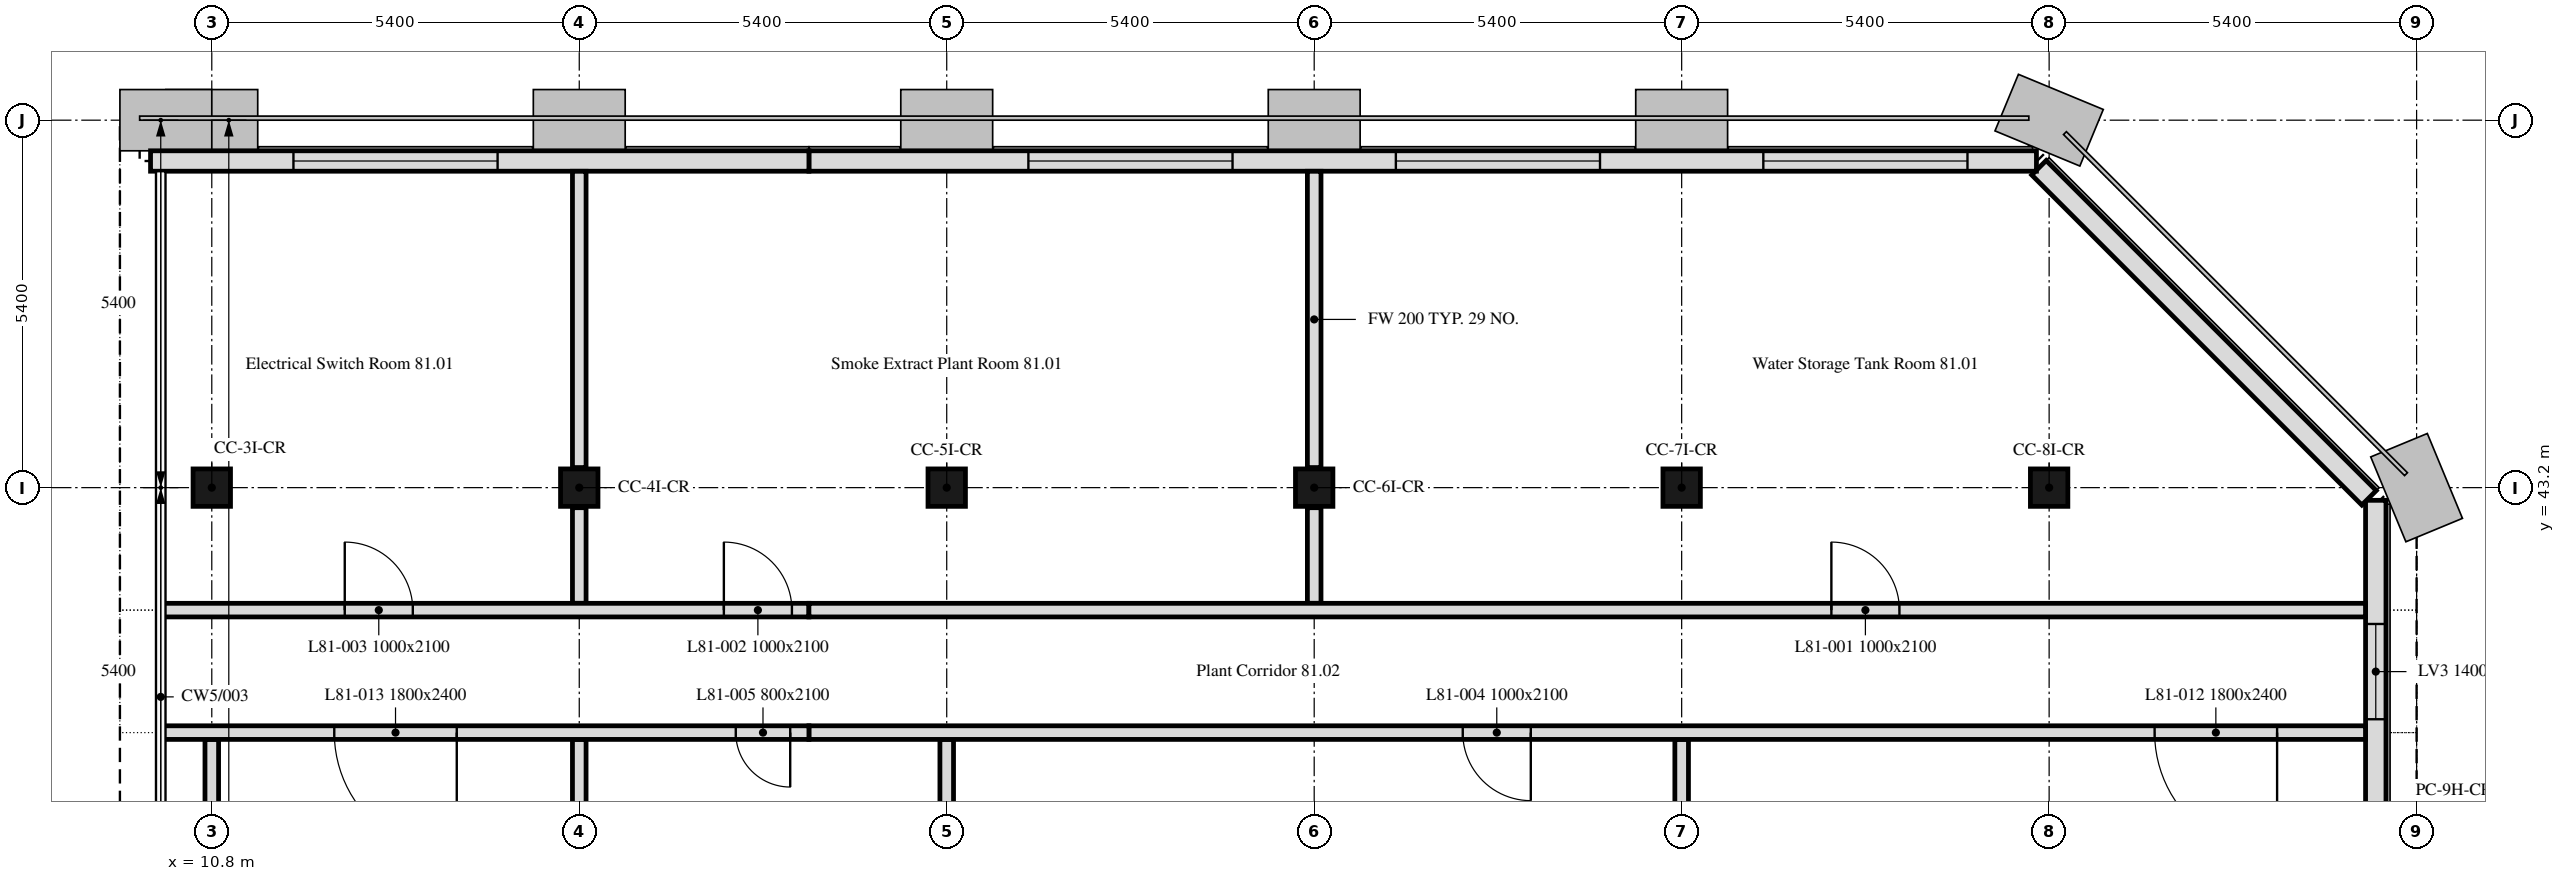
"""IFC4 building model, lengths in metres.
Left out: names, types, materials, properties, quantities, classifications, styles, units other than length and angle.
Written with IfcOpenShell. Run it as: python <this file> out.ifc"""

import sys

from ifc_helpers import new_model, si_unit, direction, frame, frame_2d, origin, origin_2d, place, context, subcontext, project, spatial, polyline, rectangle, outline, extrude, element, fill, save


model = new_model("IFC4")
c1 = context("Model", 3, precision=1e-05, world=origin(), true_north=direction((0.0, 1.0)))
c2 = subcontext(c1, "Body", "Model", "MODEL_VIEW")
j1 = project(units=[si_unit("LENGTHUNIT", "METRE"), si_unit("PLANEANGLEUNIT", "RADIAN")], contexts=[c1])
p1 = place(None, origin())
s1 = spatial("IfcSite", under=j1, at=p1, CompositionType="ELEMENT")
p2 = place(p1, origin())
s2 = spatial("IfcBuilding", under=s1, at=p2, CompositionType="ELEMENT")
p3 = place(p2, frame((0.0, 0.0, 326.2)))
s3 = spatial("IfcBuildingStorey", under=s2, at=p3, CompositionType="ELEMENT", Elevation=326.2)
p4 = place(p3, frame((10.8, 43.2, 0.0), z_axis=(0.0, 0.0, 1.0), x_axis=(1.0, 0.0, 0.0)))
e1 = element("IfcColumn", 1, at=p4, inside=s3, PredefinedType="COLUMN", context=c2, shape_type="SweptSolid", body=[
    extrude(rectangle(XDim=0.55, YDim=0.55, at=origin_2d()), origin(), (0.0, 0.0, 1.0), 3.3),
])
for number, where, z_axis, x_axis in (
    (2, (16.2, 43.2, 0.0), (0.0, 0.0, 1.0), (1.0, 0.0, 0.0)),
    (3, (21.6, 43.2, 0.0), (0.0, 0.0, 1.0), (1.0, 0.0, 0.0)),
    (4, (27.0, 43.2, 0.0), (0.0, 0.0, 1.0), (1.0, 0.0, 0.0)),
    (5, (32.4, 43.2, 0.0), (0.0, 0.0, 1.0), (1.0, 0.0, 0.0)),
    (6, (37.8, 43.2, 0.0), (0.0, 0.0, 1.0), (1.0, 0.0, 0.0)),
):
    element("IfcColumn", number, at=place(p3, frame(where, z_axis=z_axis, x_axis=x_axis)), inside=s3, PredefinedType="COLUMN", context=c2, shape_type="SweptSolid", body=[
        extrude(rectangle(XDim=0.55, YDim=0.55, at=origin_2d()), origin(), (0.0, 0.0, 1.0), 4.2),
    ])
p5 = place(p3, frame((42.6, 32.4, 0.0), z_axis=(0.0, 0.0, 1.0), x_axis=(0.0, 1.0, 0.0)))
e7 = element("IfcWall", 7, at=p5, inside=s3, PredefinedType="SOLIDWALL", context=c2, shape_type="SweptSolid", body=[
    extrude(outline(polyline([(0.0, 0.0), (10.614, 0.0), (10.614, 4.2), (10.024, 4.2), (9.434, 4.2), (8.845, 4.2), (8.255, 4.2), (7.665, 4.2), (7.076, 4.2), (6.486, 4.2), (5.896, 4.2), (5.307, 4.2), (4.717, 4.2), (4.127, 4.2), (3.538, 4.2), (2.948, 4.2), (2.359, 4.2), (1.769, 4.2), (1.179, 4.2), (0.59, 4.2), (0.0, 4.2), (0.0, 0.0)])), frame((0.0, 0.15, 0.0), z_axis=(0.0, -1.0, 0.0), x_axis=(1.0, 0.0, 0.0)), (0.0, 0.0, 1.0), 0.3),
])
p6 = place(p5, frame((1.2, 0.0, 0.6)))
e8 = element("IfcOpeningElement", 8, at=p6, cuts=e7, PredefinedType="OPENING", context=c2, shape_type="SweptSolid", body=[
    extrude(rectangle(XDim=3.0, YDim=1.8, at=frame_2d((1.5, 0.9))), frame((0.0, 0.16, 0.0), z_axis=(0.0, -1.0, 0.0), x_axis=(1.0, 0.0, 0.0)), (0.0, 0.0, 1.0), 0.32),
])
p7 = place(p5, frame((7.396, 0.0, 0.6)))
e9 = element("IfcOpeningElement", 9, at=p7, cuts=e7, PredefinedType="OPENING", context=c2, shape_type="SweptSolid", body=[
    extrude(rectangle(XDim=1.4, YDim=1.8, at=frame_2d((0.7, 0.9))), frame((0.0, 0.16, 0.0), z_axis=(0.0, -1.0, 0.0), x_axis=(1.0, 0.0, 0.0)), (0.0, 0.0, 1.0), 0.32),
])
p8 = place(p3, frame((42.501, 43.051, 0.0), z_axis=(0.0, 0.0, 1.0), x_axis=(-0.707106781187, 0.707106781187, 0.0)))
e10 = element("IfcWall", 10, at=p8, inside=s3, PredefinedType="SOLIDWALL", context=c2, shape_type="SweptSolid", body=[
    extrude(outline(polyline([(0.0, 0.0), (6.86, 0.0), (6.86, 4.2), (6.288, 4.2), (5.716, 4.2), (5.145, 4.2), (4.573, 4.2), (4.001, 4.2), (3.43, 4.2), (2.858, 4.2), (2.287, 4.2), (1.715, 4.2), (1.143, 4.2), (0.572, 4.2), (0.0, 4.2), (0.0, 0.0)])), frame((0.0, 0.15, 0.0), z_axis=(0.0, -1.0, 0.0), x_axis=(1.0, 0.0, 0.0)), (0.0, 0.0, 1.0), 0.3),
])
p9 = place(p3, frame((37.614, 48.0, 0.0), z_axis=(0.0, 0.0, 1.0), x_axis=(-1.0, 0.0, 0.0)))
e11 = element("IfcWall", 11, at=p9, inside=s3, PredefinedType="SOLIDWALL", context=c2, shape_type="SweptSolid", body=[
    extrude(outline(polyline([(0.0, 0.0), (18.039, 0.0), (18.039, 4.2), (17.457, 4.2), (16.875, 4.2), (16.293, 4.2), (15.711, 4.2), (15.129, 4.2), (14.547, 4.2), (13.965, 4.2), (13.384, 4.2), (12.802, 4.2), (12.22, 4.2), (11.638, 4.2), (11.056, 4.2), (10.474, 4.2), (9.892, 4.2), (9.31, 4.2), (8.728, 4.2), (8.146, 4.2), (7.565, 4.2), (6.983, 4.2), (6.401, 4.2), (5.819, 4.2), (5.237, 4.2), (4.655, 4.2), (4.073, 4.2), (3.491, 4.2), (2.909, 4.2), (2.328, 4.2), (1.746, 4.2), (1.164, 4.2), (0.582, 4.2), (0.0, 4.2), (0.0, 0.0)])), frame((0.0, 0.15, 0.0), z_axis=(0.0, -1.0, 0.0), x_axis=(1.0, 0.0, 0.0)), (0.0, 0.0, 1.0), 0.3),
])
p10 = place(p9, frame((1.014, 0.0, 0.6)))
e12 = element("IfcOpeningElement", 12, at=p10, cuts=e11, PredefinedType="OPENING", context=c2, shape_type="SweptSolid", body=[
    extrude(rectangle(XDim=3.0, YDim=1.8, at=frame_2d((1.5, 0.9))), frame((0.0, 0.16, 0.0), z_axis=(0.0, -1.0, 0.0), x_axis=(1.0, 0.0, 0.0)), (0.0, 0.0, 1.0), 0.32),
])
p11 = place(p9, frame((6.414, 0.0, 0.6)))
e13 = element("IfcOpeningElement", 13, at=p11, cuts=e11, PredefinedType="OPENING", context=c2, shape_type="SweptSolid", body=[
    extrude(rectangle(XDim=3.0, YDim=1.8, at=frame_2d((1.5, 0.9))), frame((0.0, 0.16, 0.0), z_axis=(0.0, -1.0, 0.0), x_axis=(1.0, 0.0, 0.0)), (0.0, 0.0, 1.0), 0.32),
])
p12 = place(p9, frame((11.814, 0.0, 0.6)))
e14 = element("IfcOpeningElement", 14, at=p12, cuts=e11, PredefinedType="OPENING", context=c2, shape_type="SweptSolid", body=[
    extrude(rectangle(XDim=3.0, YDim=1.8, at=frame_2d((1.5, 0.9))), frame((0.0, 0.16, 0.0), z_axis=(0.0, -1.0, 0.0), x_axis=(1.0, 0.0, 0.0)), (0.0, 0.0, 1.0), 0.32),
])
p13 = place(p3, frame((19.575, 48.0, 0.0), z_axis=(0.0, 0.0, 1.0), x_axis=(-1.0, 0.0, 0.0)))
e15 = element("IfcWall", 15, at=p13, inside=s3, PredefinedType="SOLIDWALL", context=c2, shape_type="SweptSolid", body=[
    extrude(outline(polyline([(0.0, 0.0), (9.675, 0.0), (9.675, 2.9), (9.106, 3.153), (8.537, 3.406), (7.968, 3.659), (7.398, 3.912), (6.829, 4.165), (6.26, 4.418), (5.691, 4.671), (5.122, 4.924), (4.553, 5.177), (3.984, 5.429), (3.415, 5.682), (2.846, 5.935), (2.276, 6.188), (1.707, 6.441), (1.138, 6.694), (0.569, 6.947), (0.0, 4.2), (0.0, 0.0)])), frame((0.0, 0.15, 0.0), z_axis=(0.0, -1.0, 0.0), x_axis=(1.0, 0.0, 0.0)), (0.0, 0.0, 1.0), 0.3),
])
p14 = place(p13, frame((4.575, 0.0, 0.6)))
e16 = element("IfcOpeningElement", 16, at=p14, cuts=e15, PredefinedType="OPENING", context=c2, shape_type="SweptSolid", body=[
    extrude(rectangle(XDim=3.0, YDim=1.8, at=frame_2d((1.5, 0.9))), frame((0.0, 0.16, 0.0), z_axis=(0.0, -1.0, 0.0), x_axis=(1.0, 0.0, 0.0)), (0.0, 0.0, 1.0), 0.32),
])
p15 = place(p3, frame((27.0, 47.849, 0.0), z_axis=(0.0, 0.0, 1.0), x_axis=(0.0, -1.0, 0.0)))
e17 = element("IfcWall", 17, at=p15, inside=s3, PredefinedType="PARTITIONING", context=c2, shape_type="SweptSolid", body=[
    extrude(rectangle(XDim=4.354, YDim=0.2, at=frame_2d((2.177, 0.0))), origin(), (0.0, 0.0, 1.0), 3.45),
])
p16 = place(p3, frame((27.0, 42.905, 0.0), z_axis=(0.0, 0.0, 1.0), x_axis=(0.0, -1.0, 0.0)))
e18 = element("IfcWall", 18, at=p16, inside=s3, PredefinedType="PARTITIONING", context=c2, shape_type="SweptSolid", body=[
    extrude(rectangle(XDim=1.405, YDim=0.2, at=frame_2d((0.703, 0.0))), origin(), (0.0, 0.0, 1.0), 3.45),
])
p17 = place(p3, frame((16.2, 47.849, 0.0), z_axis=(0.0, 0.0, 1.0), x_axis=(0.0, -1.0, 0.0)))
e19 = element("IfcWall", 19, at=p17, inside=s3, PredefinedType="PARTITIONING", context=c2, shape_type="SweptSolid", body=[
    extrude(rectangle(XDim=4.354, YDim=0.2, at=frame_2d((2.177, 0.0))), origin(), (0.0, 0.0, 1.0), 5.7),
])
p18 = place(p3, frame((16.2, 42.905, 0.0), z_axis=(0.0, 0.0, 1.0), x_axis=(0.0, -1.0, 0.0)))
e20 = element("IfcWall", 20, at=p18, inside=s3, PredefinedType="PARTITIONING", context=c2, shape_type="SweptSolid", body=[
    extrude(rectangle(XDim=1.405, YDim=0.2, at=frame_2d((0.703, 0.0))), origin(), (0.0, 0.0, 1.0), 5.7),
])
p19 = place(p3, frame((10.05, 41.4, 0.0), z_axis=(0.0, 0.0, 1.0), x_axis=(1.0, 0.0, 0.0)))
e21 = element("IfcWall", 21, at=p19, inside=s3, PredefinedType="PARTITIONING", context=c2, shape_type="SweptSolid", body=[
    extrude(outline(polyline([(0.0, 0.0), (9.525, 0.0), (9.525, 4.2), (0.0, 2.967), (0.0, 0.0)])), frame((0.0, 0.1, 0.0), z_axis=(0.0, -1.0, 0.0), x_axis=(1.0, 0.0, 0.0)), (0.0, 0.0, 1.0), 0.2),
])
p20 = place(p19, frame((8.275, 0.0, 0.0)))
e22 = element("IfcOpeningElement", 22, at=p20, cuts=e21, PredefinedType="OPENING", context=c2, shape_type="SweptSolid", body=[
    extrude(rectangle(XDim=1.0, YDim=2.1, at=frame_2d((0.5, 1.05))), frame((0.0, 0.1, 0.0), z_axis=(0.0, -1.0, 0.0), x_axis=(1.0, 0.0, 0.0)), (0.0, 0.0, 1.0), 0.2),
])
p21 = place(p19, frame((2.704, 0.0, 0.0)))
e23 = element("IfcOpeningElement", 23, at=p21, cuts=e21, PredefinedType="OPENING", context=c2, shape_type="SweptSolid", body=[
    extrude(rectangle(XDim=1.0, YDim=2.1, at=frame_2d((0.5, 1.05))), frame((0.0, 0.1, 0.0), z_axis=(0.0, -1.0, 0.0), x_axis=(1.0, 0.0, 0.0)), (0.0, 0.0, 1.0), 0.2),
])
p22 = place(p3, frame((19.575, 41.4, 0.0), z_axis=(0.0, 0.0, 1.0), x_axis=(1.0, 0.0, 0.0)))
e24 = element("IfcWall", 24, at=p22, inside=s3, PredefinedType="PARTITIONING", context=c2, shape_type="SweptSolid", body=[
    extrude(rectangle(XDim=22.874, YDim=0.2, at=frame_2d((11.437, 0.0))), origin(), (0.0, 0.0, 1.0), 3.45),
])
p23 = place(p22, frame((15.025, 0.0, 0.0)))
e25 = element("IfcOpeningElement", 25, at=p23, cuts=e24, PredefinedType="OPENING", context=c2, shape_type="SweptSolid", body=[
    extrude(rectangle(XDim=1.0, YDim=2.1, at=frame_2d((0.5, 1.05))), frame((0.0, 0.1, 0.0), z_axis=(0.0, -1.0, 0.0), x_axis=(1.0, 0.0, 0.0)), (0.0, 0.0, 1.0), 0.2),
])
for number, where, z_axis, x_axis in (
    (26, (32.4, 38.095, 0.0), (0.0, 0.0, 1.0), (0.0, 1.0, 0.0)),
    (27, (21.6, 39.5, 0.0), (0.0, 0.0, 1.0), (0.0, -1.0, 0.0)),
):
    element("IfcWall", number, at=place(p3, frame(where, z_axis=z_axis, x_axis=x_axis)), inside=s3, PredefinedType="PARTITIONING", context=c2, shape_type="SweptSolid", body=[
        extrude(rectangle(XDim=1.405, YDim=0.2, at=frame_2d((0.703, 0.0))), origin(), (0.0, 0.0, 1.0), 3.45),
    ])
p24 = place(p3, frame((16.2, 39.5, 0.0), z_axis=(0.0, 0.0, 1.0), x_axis=(0.0, -1.0, 0.0)))
e28 = element("IfcWall", 28, at=p24, inside=s3, PredefinedType="PARTITIONING", context=c2, shape_type="SweptSolid", body=[
    extrude(rectangle(XDim=1.405, YDim=0.2, at=frame_2d((0.703, 0.0))), origin(), (0.0, 0.0, 1.0), 5.7),
])
p25 = place(p3, frame((10.8, 39.5, 0.0), z_axis=(0.0, 0.0, 1.0), x_axis=(0.0, -1.0, 0.0)))
e29 = element("IfcWall", 29, at=p25, inside=s3, PredefinedType="PARTITIONING", context=c2, shape_type="SweptSolid", body=[
    extrude(rectangle(XDim=1.405, YDim=0.2, at=frame_2d((0.703, 0.0))), origin(), (0.0, 0.0, 1.0), 3.3),
])
p26 = place(p3, frame((42.449, 39.6, 0.0), z_axis=(0.0, 0.0, 1.0), x_axis=(-1.0, 0.0, 0.0)))
e30 = element("IfcWall", 30, at=p26, inside=s3, PredefinedType="PARTITIONING", context=c2, shape_type="SweptSolid", body=[
    extrude(rectangle(XDim=22.874, YDim=0.2, at=frame_2d((11.437, 0.0))), origin(), (0.0, 0.0, 1.0), 3.45),
])
p27 = place(p26, frame((12.266, 0.0, 0.0)))
e31 = element("IfcOpeningElement", 31, at=p27, cuts=e30, PredefinedType="OPENING", context=c2, shape_type="SweptSolid", body=[
    extrude(rectangle(XDim=1.0, YDim=2.1, at=frame_2d((0.5, 1.05))), frame((0.0, 0.1, 0.0), z_axis=(0.0, -1.0, 0.0), x_axis=(1.0, 0.0, 0.0)), (0.0, 0.0, 1.0), 0.2),
])
p28 = place(p26, frame((1.299, 0.0, 0.0)))
e32 = element("IfcOpeningElement", 32, at=p28, cuts=e30, PredefinedType="OPENING", context=c2, shape_type="SweptSolid", body=[
    extrude(rectangle(XDim=1.8, YDim=2.4, at=frame_2d((0.9, 1.2))), frame((0.0, 0.1, 0.0), z_axis=(0.0, -1.0, 0.0), x_axis=(1.0, 0.0, 0.0)), (0.0, 0.0, 1.0), 0.2),
])
p29 = place(p3, frame((19.575, 39.6, 0.0), z_axis=(0.0, 0.0, 1.0), x_axis=(-1.0, 0.0, 0.0)))
e33 = element("IfcWall", 33, at=p29, inside=s3, PredefinedType="PARTITIONING", context=c2, shape_type="SweptSolid", body=[
    extrude(outline(polyline([(0.0, 0.0), (9.525, 0.0), (9.525, 2.967), (0.0, 4.2), (0.0, 0.0)])), frame((0.0, 0.1, 0.0), z_axis=(0.0, -1.0, 0.0), x_axis=(1.0, 0.0, 0.0)), (0.0, 0.0, 1.0), 0.2),
])
p30 = place(p29, frame((0.275, 0.0, 0.0)))
e34 = element("IfcOpeningElement", 34, at=p30, cuts=e33, PredefinedType="OPENING", context=c2, shape_type="SweptSolid", body=[
    extrude(rectangle(XDim=0.8, YDim=2.1, at=frame_2d((0.4, 1.05))), frame((0.0, 0.1, 0.0), z_axis=(0.0, -1.0, 0.0), x_axis=(1.0, 0.0, 0.0)), (0.0, 0.0, 1.0), 0.2),
])
p31 = place(p29, frame((5.175, 0.0, 0.0)))
e35 = element("IfcOpeningElement", 35, at=p31, cuts=e33, PredefinedType="OPENING", context=c2, shape_type="SweptSolid", body=[
    extrude(rectangle(XDim=1.8, YDim=2.4, at=frame_2d((0.9, 1.2))), frame((0.0, 0.1, 0.0), z_axis=(0.0, -1.0, 0.0), x_axis=(1.0, 0.0, 0.0)), (0.0, 0.0, 1.0), 0.2),
])
p32 = place(p7, origin())
e36 = element("IfcWindow", 36, at=p32, inside=s3, PartitioningType="SINGLE_PANEL", PredefinedType="WINDOW", context=c2, shape_type="SweptSolid", body=[
    extrude(rectangle(XDim=1.4, YDim=1.8, at=frame_2d((0.7, 0.9))), frame((0.0, 0.03, 0.0), z_axis=(0.0, -1.0, 0.0), x_axis=(1.0, 0.0, 0.0)), (0.0, 0.0, 1.0), 0.06),
])
fill(e9, e36)
p33 = place(p10, origin())
e37 = element("IfcWindow", 37, at=p33, inside=s3, PartitioningType="SINGLE_PANEL", PredefinedType="WINDOW", context=c2, shape_type="SweptSolid", body=[
    extrude(rectangle(XDim=3.0, YDim=1.8, at=frame_2d((1.5, 0.9))), frame((0.0, 0.03, 0.0), z_axis=(0.0, -1.0, 0.0), x_axis=(1.0, 0.0, 0.0)), (0.0, 0.0, 1.0), 0.06),
])
fill(e12, e37)
p34 = place(p11, origin())
e38 = element("IfcWindow", 38, at=p34, inside=s3, PartitioningType="SINGLE_PANEL", PredefinedType="WINDOW", context=c2, shape_type="SweptSolid", body=[
    extrude(rectangle(XDim=3.0, YDim=1.8, at=frame_2d((1.5, 0.9))), frame((0.0, 0.03, 0.0), z_axis=(0.0, -1.0, 0.0), x_axis=(1.0, 0.0, 0.0)), (0.0, 0.0, 1.0), 0.06),
])
fill(e13, e38)
p35 = place(p12, origin())
e39 = element("IfcWindow", 39, at=p35, inside=s3, PartitioningType="SINGLE_PANEL", PredefinedType="WINDOW", context=c2, shape_type="SweptSolid", body=[
    extrude(rectangle(XDim=3.0, YDim=1.8, at=frame_2d((1.5, 0.9))), frame((0.0, 0.03, 0.0), z_axis=(0.0, -1.0, 0.0), x_axis=(1.0, 0.0, 0.0)), (0.0, 0.0, 1.0), 0.06),
])
fill(e14, e39)
p36 = place(p14, origin())
e40 = element("IfcWindow", 40, at=p36, inside=s3, PartitioningType="SINGLE_PANEL", PredefinedType="WINDOW", context=c2, shape_type="SweptSolid", body=[
    extrude(rectangle(XDim=3.0, YDim=1.8, at=frame_2d((1.5, 0.9))), frame((0.0, 0.03, 0.0), z_axis=(0.0, -1.0, 0.0), x_axis=(1.0, 0.0, 0.0)), (0.0, 0.0, 1.0), 0.06),
])
fill(e16, e40)
p37 = place(p23, origin())
e41 = element("IfcDoor", 41, at=p37, inside=s3, OperationType="SINGLE_SWING_LEFT", PredefinedType="DOOR", context=c2, shape_type="SweptSolid", body=[
    extrude(rectangle(XDim=1.0, YDim=2.1, at=frame_2d((0.5, 1.05))), frame((0.0, 0.025, 0.0), z_axis=(0.0, -1.0, 0.0), x_axis=(1.0, 0.0, 0.0)), (0.0, 0.0, 1.0), 0.05),
])
fill(e25, e41)
p38 = place(p20, origin())
e42 = element("IfcDoor", 42, at=p38, inside=s3, OperationType="SINGLE_SWING_RIGHT", PredefinedType="DOOR", context=c2, shape_type="SweptSolid", body=[
    extrude(rectangle(XDim=1.0, YDim=2.1, at=frame_2d((0.5, 1.05))), frame((0.0, 0.025, 0.0), z_axis=(0.0, -1.0, 0.0), x_axis=(1.0, 0.0, 0.0)), (0.0, 0.0, 1.0), 0.05),
])
fill(e22, e42)
p39 = place(p21, origin())
e43 = element("IfcDoor", 43, at=p39, inside=s3, OperationType="SINGLE_SWING_RIGHT", PredefinedType="DOOR", context=c2, shape_type="SweptSolid", body=[
    extrude(rectangle(XDim=1.0, YDim=2.1, at=frame_2d((0.5, 1.05))), frame((0.0, 0.025, 0.0), z_axis=(0.0, -1.0, 0.0), x_axis=(1.0, 0.0, 0.0)), (0.0, 0.0, 1.0), 0.05),
])
fill(e23, e43)
p40 = place(p27, origin())
e44 = element("IfcDoor", 44, at=p40, inside=s3, OperationType="SINGLE_SWING_LEFT", PredefinedType="DOOR", context=c2, shape_type="SweptSolid", body=[
    extrude(rectangle(XDim=1.0, YDim=2.1, at=frame_2d((0.5, 1.05))), frame((0.0, 0.025, 0.0), z_axis=(0.0, -1.0, 0.0), x_axis=(1.0, 0.0, 0.0)), (0.0, 0.0, 1.0), 0.05),
])
fill(e31, e44)
p41 = place(p30, origin())
e45 = element("IfcDoor", 45, at=p41, inside=s3, OperationType="SINGLE_SWING_RIGHT", PredefinedType="DOOR", context=c2, shape_type="SweptSolid", body=[
    extrude(rectangle(XDim=0.8, YDim=2.1, at=frame_2d((0.4, 1.05))), frame((0.0, 0.025, 0.0), z_axis=(0.0, -1.0, 0.0), x_axis=(1.0, 0.0, 0.0)), (0.0, 0.0, 1.0), 0.05),
])
fill(e34, e45)
p42 = place(p28, origin())
e46 = element("IfcDoor", 46, at=p42, inside=s3, OperationType="DOUBLE_DOOR_SINGLE_SWING", PredefinedType="DOOR", context=c2, shape_type="SweptSolid", body=[
    extrude(rectangle(XDim=1.8, YDim=2.4, at=frame_2d((0.9, 1.2))), frame((0.0, 0.025, 0.0), z_axis=(0.0, -1.0, 0.0), x_axis=(1.0, 0.0, 0.0)), (0.0, 0.0, 1.0), 0.05),
])
fill(e32, e46)
p43 = place(p31, origin())
e47 = element("IfcDoor", 47, at=p43, inside=s3, OperationType="DOUBLE_DOOR_SINGLE_SWING", PredefinedType="DOOR", context=c2, shape_type="SweptSolid", body=[
    extrude(rectangle(XDim=1.8, YDim=2.4, at=frame_2d((0.9, 1.2))), frame((0.0, 0.025, 0.0), z_axis=(0.0, -1.0, 0.0), x_axis=(1.0, 0.0, 0.0)), (0.0, 0.0, 1.0), 0.05),
])
fill(e35, e47)
save(model, sys.argv[1])
